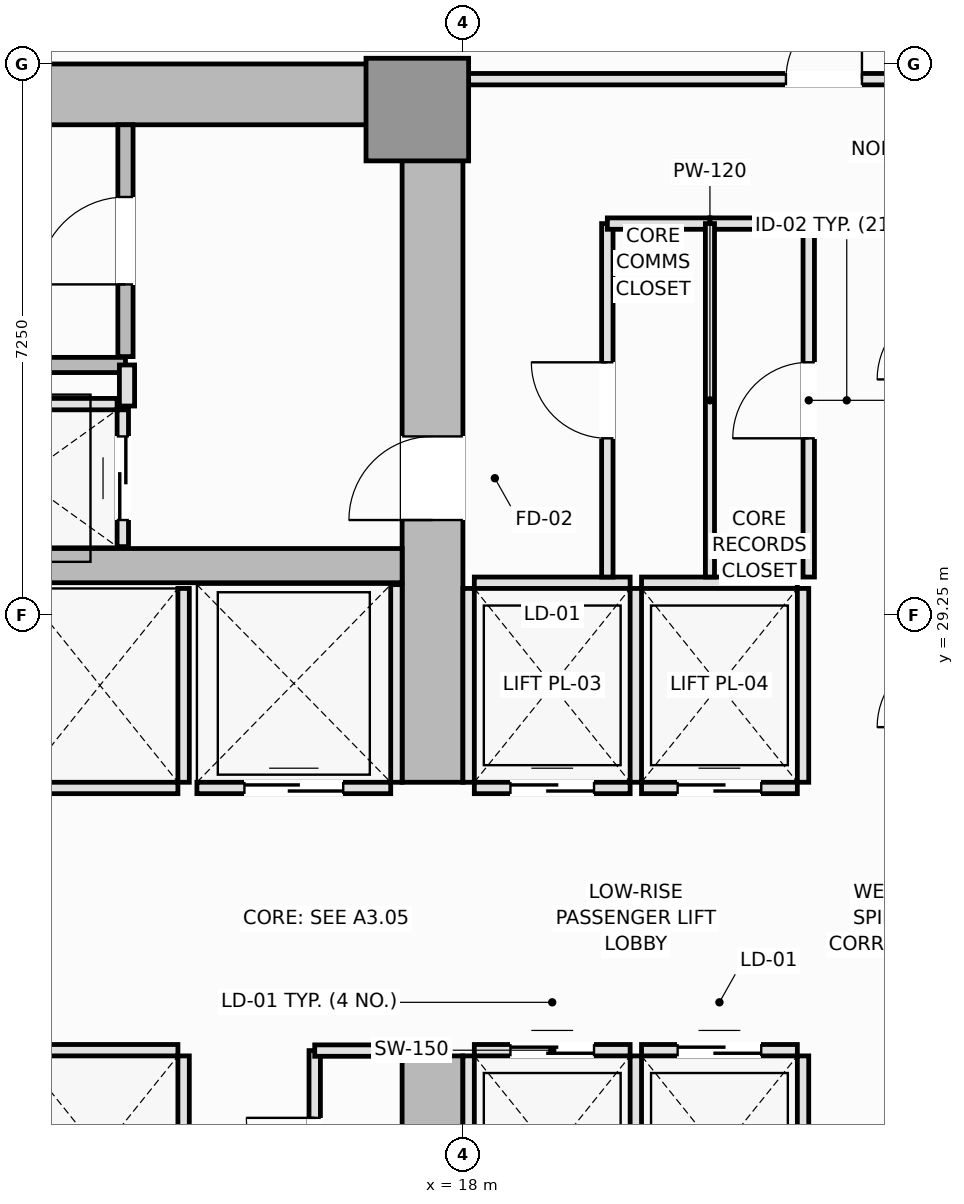
"""IFC4 building model, lengths in metres.
Left out: names, types, materials, properties, quantities, classifications, styles, units other than length and angle.
Written with IfcOpenShell. Run it as: python <this file> out.ifc"""

import sys

from ifc_helpers import new_model, si_unit, direction, frame, frame_2d, origin, origin_2d, place, context, subcontext, project, spatial, rectangle, extrude, element, fill, save


model = new_model("IFC4")
c1 = context("Model", 3, precision=1e-05, world=origin(), true_north=direction((0.0, 1.0)))
c2 = subcontext(c1, "Body", "Model", "MODEL_VIEW")
j1 = project(units=[si_unit("LENGTHUNIT", "METRE"), si_unit("PLANEANGLEUNIT", "RADIAN")], contexts=[c1])
p1 = place(None, origin())
s1 = spatial("IfcSite", under=j1, at=p1, CompositionType="ELEMENT")
p2 = place(p1, origin())
s2 = spatial("IfcBuilding", under=s1, at=p2, CompositionType="ELEMENT")
p3 = place(p2, frame((0.0, 0.0, 78.85)))
s3 = spatial("IfcBuildingStorey", under=s2, at=p3, CompositionType="ELEMENT", Elevation=78.85)
p4 = place(p3, frame((4.5, 36.1, 0.0), z_axis=(0.0, 0.0, 1.0), x_axis=(1.0, 0.0, 0.0)))
e1 = element("IfcWall", 1, at=p4, inside=s3, PredefinedType="SHEAR", context=c2, shape_type="SweptSolid", body=[
    extrude(rectangle(XDim=13.5, YDim=0.8, at=frame_2d((6.75, 0.0))), origin(), (0.0, 0.0, 1.0), 3.55),
])
p5 = place(p3, frame((17.6, 14.8, 0.0), z_axis=(0.0, 0.0, 1.0), x_axis=(0.0, 1.0, 0.0)))
e2 = element("IfcWall", 2, at=p5, inside=s3, PredefinedType="SHEAR", context=c2, shape_type="SweptSolid", body=[
    extrude(rectangle(XDim=8.65, YDim=0.8, at=frame_2d((4.325, 0.0))), origin(), (0.0, 0.0, 1.0), 3.55),
])
p6 = place(p5, frame((4.1, 0.0, 0.0)))
e3 = element("IfcOpeningElement", 3, at=p6, cuts=e2, PredefinedType="OPENING", context=c2, shape_type="SweptSolid", body=[
    extrude(rectangle(XDim=1.1, YDim=2.15, at=frame_2d((0.55, 1.075))), frame((0.0, 0.41, 0.0), z_axis=(0.0, -1.0, 0.0), x_axis=(1.0, 0.0, 0.0)), (0.0, 0.0, 1.0), 0.82),
])
p7 = place(p3, frame((17.6, 27.05, 0.0), z_axis=(0.0, 0.0, 1.0), x_axis=(0.0, 1.0, 0.0)))
e4 = element("IfcWall", 4, at=p7, inside=s3, PredefinedType="SHEAR", context=c2, shape_type="SweptSolid", body=[
    extrude(rectangle(XDim=8.65, YDim=0.8, at=frame_2d((4.325, 0.0))), origin(), (0.0, 0.0, 1.0), 3.55),
])
p8 = place(p7, frame((3.45, 0.0, 0.0)))
e5 = element("IfcOpeningElement", 5, at=p8, cuts=e4, PredefinedType="OPENING", context=c2, shape_type="SweptSolid", body=[
    extrude(rectangle(XDim=1.1, YDim=2.15, at=frame_2d((0.55, 1.075))), frame((0.0, 0.41, 0.0), z_axis=(0.0, -1.0, 0.0), x_axis=(1.0, 0.0, 0.0)), (0.0, 0.0, 1.0), 0.82),
])
p9 = place(p3, frame((5.3, 29.9, 0.0), z_axis=(0.0, 0.0, 1.0), x_axis=(1.0, 0.0, 0.0)))
e6 = element("IfcWall", 6, at=p9, inside=s3, PredefinedType="SHEAR", context=c2, shape_type="SweptSolid", body=[
    extrude(rectangle(XDim=11.9, YDim=0.45, at=frame_2d((5.95, 0.0))), origin(), (0.0, 0.0, 1.0), 3.55),
])
p10 = place(p3, frame((17.4, 35.9, 0.0), z_axis=(0.0, 0.0, 1.0), x_axis=(1.0, 0.0, 0.0)))
e7 = element("IfcColumn", 7, at=p10, inside=s3, PredefinedType="PILASTER", context=c2, shape_type="SweptSolid", body=[
    extrude(rectangle(XDim=1.35, YDim=1.35, at=origin_2d()), origin(), (0.0, 0.0, 1.0), 3.55),
])
p11 = place(p3, frame((5.9, 32.54, 0.0), z_axis=(0.0, 0.0, 1.0), x_axis=(1.0, 0.0, 0.0)))
e8 = element("IfcWall", 8, at=p11, inside=s3, PredefinedType="SOLIDWALL", context=c2, shape_type="SweptSolid", body=[
    extrude(rectangle(XDim=7.66, YDim=0.2, at=frame_2d((3.83, 0.0))), origin(), (0.0, 0.0, 1.0), 3.55),
])
p12 = place(p3, frame((13.56, 32.65, 0.0), z_axis=(0.0, 0.0, 1.0), x_axis=(0.0, 1.0, 0.0)))
e9 = element("IfcWall", 9, at=p12, inside=s3, PredefinedType="SOLIDWALL", context=c2, shape_type="SweptSolid", body=[
    extrude(rectangle(XDim=3.05, YDim=0.2, at=frame_2d((1.525, 0.0))), origin(), (0.0, 0.0, 1.0), 3.55),
])
p13 = place(p12, frame((0.95, 0.0, 0.0)))
e10 = element("IfcOpeningElement", 10, at=p13, cuts=e9, PredefinedType="OPENING", context=c2, shape_type="SweptSolid", body=[
    extrude(rectangle(XDim=1.15, YDim=2.15, at=frame_2d((0.575, 1.075))), frame((0.0, 0.11, 0.0), z_axis=(0.0, -1.0, 0.0), x_axis=(1.0, 0.0, 0.0)), (0.0, 0.0, 1.0), 0.22),
])
p14 = place(p3, frame((18.15, 23.525, 0.0), z_axis=(0.0, 0.0, 1.0), x_axis=(1.0, 0.0, 0.0)))
e11 = element("IfcWall", 11, at=p14, inside=s3, PredefinedType="PARTITIONING", context=c2, shape_type="SweptSolid", body=[
    extrude(rectangle(XDim=2.05, YDim=0.15, at=frame_2d((1.025, 0.0))), origin(), (0.0, 0.0, 1.0), 3.37),
])
p15 = place(p14, frame((0.475, 0.0, 0.0)))
e12 = element("IfcOpeningElement", 12, at=p15, cuts=e11, PredefinedType="OPENING", context=c2, shape_type="SweptSolid", body=[
    extrude(rectangle(XDim=1.1, YDim=2.2, at=frame_2d((0.55, 1.1))), frame((0.0, 0.085, 0.0), z_axis=(0.0, -1.0, 0.0), x_axis=(1.0, 0.0, 0.0)), (0.0, 0.0, 1.0), 0.17),
])
for number, where, z_axis, x_axis in (
    (13, (18.075, 20.9, 0.0), (0.0, 0.0, 1.0), (0.0, 1.0, 0.0)),
    (14, (20.275, 20.9, 0.0), (0.0, 0.0, 1.0), (0.0, 1.0, 0.0)),
):
    element("IfcWall", number, at=place(p3, frame(where, z_axis=z_axis, x_axis=x_axis)), inside=s3, PredefinedType="PARTITIONING", context=c2, shape_type="SweptSolid", body=[
        extrude(rectangle(XDim=2.55, YDim=0.15, at=frame_2d((1.275, 0.0))), origin(), (0.0, 0.0, 1.0), 3.37),
    ])
p16 = place(p3, frame((20.35, 23.525, 0.0), z_axis=(0.0, 0.0, 1.0), x_axis=(1.0, 0.0, 0.0)))
e15 = element("IfcWall", 15, at=p16, inside=s3, PredefinedType="PARTITIONING", context=c2, shape_type="SweptSolid", body=[
    extrude(rectangle(XDim=2.05, YDim=0.15, at=frame_2d((1.025, 0.0))), origin(), (0.0, 0.0, 1.0), 3.37),
])
p17 = place(p16, frame((0.475, 0.0, 0.0)))
e16 = element("IfcOpeningElement", 16, at=p17, cuts=e15, PredefinedType="OPENING", context=c2, shape_type="SweptSolid", body=[
    extrude(rectangle(XDim=1.1, YDim=2.2, at=frame_2d((0.55, 1.1))), frame((0.0, 0.085, 0.0), z_axis=(0.0, -1.0, 0.0), x_axis=(1.0, 0.0, 0.0)), (0.0, 0.0, 1.0), 0.17),
])
p18 = place(p3, frame((22.475, 20.9, 0.0), z_axis=(0.0, 0.0, 1.0), x_axis=(0.0, 1.0, 0.0)))
e17 = element("IfcWall", 17, at=p18, inside=s3, PredefinedType="PARTITIONING", context=c2, shape_type="SweptSolid", body=[
    extrude(rectangle(XDim=2.55, YDim=0.15, at=frame_2d((1.275, 0.0))), origin(), (0.0, 0.0, 1.0), 3.37),
])
p19 = place(p3, frame((18.15, 26.975, 0.0), z_axis=(0.0, 0.0, 1.0), x_axis=(1.0, 0.0, 0.0)))
e18 = element("IfcWall", 18, at=p19, inside=s3, PredefinedType="PARTITIONING", context=c2, shape_type="SweptSolid", body=[
    extrude(rectangle(XDim=2.05, YDim=0.15, at=frame_2d((1.025, 0.0))), origin(), (0.0, 0.0, 1.0), 3.37),
])
p20 = place(p19, frame((0.475, 0.0, 0.0)))
e19 = element("IfcOpeningElement", 19, at=p20, cuts=e18, PredefinedType="OPENING", context=c2, shape_type="SweptSolid", body=[
    extrude(rectangle(XDim=1.1, YDim=2.2, at=frame_2d((0.55, 1.1))), frame((0.0, 0.085, 0.0), z_axis=(0.0, -1.0, 0.0), x_axis=(1.0, 0.0, 0.0)), (0.0, 0.0, 1.0), 0.17),
])
p21 = place(p3, frame((18.15, 29.675, 0.0), z_axis=(0.0, 0.0, 1.0), x_axis=(1.0, 0.0, 0.0)))
e20 = element("IfcWall", 20, at=p21, inside=s3, PredefinedType="PARTITIONING", context=c2, shape_type="SweptSolid", body=[
    extrude(rectangle(XDim=2.05, YDim=0.15, at=frame_2d((1.025, 0.0))), origin(), (0.0, 0.0, 1.0), 3.37),
])
for number, where, z_axis, x_axis in (
    (21, (18.075, 27.05, 0.0), (0.0, 0.0, 1.0), (0.0, 1.0, 0.0)),
    (22, (20.275, 27.05, 0.0), (0.0, 0.0, 1.0), (0.0, 1.0, 0.0)),
):
    element("IfcWall", number, at=place(p3, frame(where, z_axis=z_axis, x_axis=x_axis)), inside=s3, PredefinedType="PARTITIONING", context=c2, shape_type="SweptSolid", body=[
        extrude(rectangle(XDim=2.55, YDim=0.15, at=frame_2d((1.275, 0.0))), origin(), (0.0, 0.0, 1.0), 3.37),
    ])
p22 = place(p3, frame((20.35, 26.975, 0.0), z_axis=(0.0, 0.0, 1.0), x_axis=(1.0, 0.0, 0.0)))
e23 = element("IfcWall", 23, at=p22, inside=s3, PredefinedType="PARTITIONING", context=c2, shape_type="SweptSolid", body=[
    extrude(rectangle(XDim=2.05, YDim=0.15, at=frame_2d((1.025, 0.0))), origin(), (0.0, 0.0, 1.0), 3.37),
])
p23 = place(p22, frame((0.475, 0.0, 0.0)))
e24 = element("IfcOpeningElement", 24, at=p23, cuts=e23, PredefinedType="OPENING", context=c2, shape_type="SweptSolid", body=[
    extrude(rectangle(XDim=1.1, YDim=2.2, at=frame_2d((0.55, 1.1))), frame((0.0, 0.085, 0.0), z_axis=(0.0, -1.0, 0.0), x_axis=(1.0, 0.0, 0.0)), (0.0, 0.0, 1.0), 0.17),
])
p24 = place(p3, frame((20.35, 29.675, 0.0), z_axis=(0.0, 0.0, 1.0), x_axis=(1.0, 0.0, 0.0)))
e25 = element("IfcWall", 25, at=p24, inside=s3, PredefinedType="PARTITIONING", context=c2, shape_type="SweptSolid", body=[
    extrude(rectangle(XDim=2.05, YDim=0.15, at=frame_2d((1.025, 0.0))), origin(), (0.0, 0.0, 1.0), 3.37),
])
p25 = place(p3, frame((22.475, 27.05, 0.0), z_axis=(0.0, 0.0, 1.0), x_axis=(0.0, 1.0, 0.0)))
e26 = element("IfcWall", 26, at=p25, inside=s3, PredefinedType="PARTITIONING", context=c2, shape_type="SweptSolid", body=[
    extrude(rectangle(XDim=2.55, YDim=0.15, at=frame_2d((1.275, 0.0))), origin(), (0.0, 0.0, 1.0), 3.37),
])
p26 = place(p3, frame((12.2, 23.525, 0.0), z_axis=(0.0, 0.0, 1.0), x_axis=(1.0, 0.0, 0.0)))
e27 = element("IfcWall", 27, at=p26, inside=s3, PredefinedType="PARTITIONING", context=c2, shape_type="SweptSolid", body=[
    extrude(rectangle(XDim=2.05, YDim=0.15, at=frame_2d((1.025, 0.0))), origin(), (0.0, 0.0, 1.0), 3.37),
])
p27 = place(p3, frame((14.325, 20.9, 0.0), z_axis=(0.0, 0.0, 1.0), x_axis=(0.0, 1.0, 0.0)))
e28 = element("IfcWall", 28, at=p27, inside=s3, PredefinedType="PARTITIONING", context=c2, shape_type="SweptSolid", body=[
    extrude(rectangle(XDim=2.55, YDim=0.15, at=frame_2d((1.275, 0.0))), origin(), (0.0, 0.0, 1.0), 3.37),
])
p28 = place(p3, frame((12.2, 26.975, 0.0), z_axis=(0.0, 0.0, 1.0), x_axis=(1.0, 0.0, 0.0)))
e29 = element("IfcWall", 29, at=p28, inside=s3, PredefinedType="PARTITIONING", context=c2, shape_type="SweptSolid", body=[
    extrude(rectangle(XDim=2.05, YDim=0.15, at=frame_2d((1.025, 0.0))), origin(), (0.0, 0.0, 1.0), 3.37),
])
p29 = place(p3, frame((14.325, 27.05, 0.0), z_axis=(0.0, 0.0, 1.0), x_axis=(0.0, 1.0, 0.0)))
e30 = element("IfcWall", 30, at=p29, inside=s3, PredefinedType="PARTITIONING", context=c2, shape_type="SweptSolid", body=[
    extrude(rectangle(XDim=2.55, YDim=0.15, at=frame_2d((1.275, 0.0))), origin(), (0.0, 0.0, 1.0), 3.37),
])
p30 = place(p3, frame((14.5, 26.975, 0.0), z_axis=(0.0, 0.0, 1.0), x_axis=(1.0, 0.0, 0.0)))
e31 = element("IfcWall", 31, at=p30, inside=s3, PredefinedType="PARTITIONING", context=c2, shape_type="SweptSolid", body=[
    extrude(rectangle(XDim=2.55, YDim=0.15, at=frame_2d((1.275, 0.0))), origin(), (0.0, 0.0, 1.0), 3.37),
])
p31 = place(p30, frame((0.625, 0.0, 0.0)))
e32 = element("IfcOpeningElement", 32, at=p31, cuts=e31, PredefinedType="OPENING", context=c2, shape_type="SweptSolid", body=[
    extrude(rectangle(XDim=1.3, YDim=2.2, at=frame_2d((0.65, 1.1))), frame((0.0, 0.085, 0.0), z_axis=(0.0, -1.0, 0.0), x_axis=(1.0, 0.0, 0.0)), (0.0, 0.0, 1.0), 0.17),
])
p32 = place(p3, frame((17.125, 27.05, 0.0), z_axis=(0.0, 0.0, 1.0), x_axis=(0.0, 1.0, 0.0)))
e33 = element("IfcWall", 33, at=p32, inside=s3, PredefinedType="PARTITIONING", context=c2, shape_type="SweptSolid", body=[
    extrude(rectangle(XDim=2.6, YDim=0.15, at=frame_2d((1.3, 0.0))), origin(), (0.0, 0.0, 1.0), 3.37),
])
p33 = place(p3, frame((10.95, 32.025, 0.0), z_axis=(0.0, 0.0, 1.0), x_axis=(1.0, 0.0, 0.0)))
e34 = element("IfcWall", 34, at=p33, inside=s3, PredefinedType="PARTITIONING", context=c2, shape_type="SweptSolid", body=[
    extrude(rectangle(XDim=2.5, YDim=0.15, at=frame_2d((1.25, 0.0))), origin(), (0.0, 0.0, 1.0), 3.37),
])
p34 = place(p3, frame((13.525, 30.15, 0.0), z_axis=(0.0, 0.0, 1.0), x_axis=(0.0, 1.0, 0.0)))
e35 = element("IfcWall", 35, at=p34, inside=s3, PredefinedType="PARTITIONING", context=c2, shape_type="SweptSolid", body=[
    extrude(rectangle(XDim=1.8, YDim=0.15, at=frame_2d((0.9, 0.0))), origin(), (0.0, 0.0, 1.0), 3.37),
])
p35 = place(p34, frame((0.35, 0.0, 0.0)))
e36 = element("IfcOpeningElement", 36, at=p35, cuts=e35, PredefinedType="OPENING", context=c2, shape_type="SweptSolid", body=[
    extrude(rectangle(XDim=1.1, YDim=2.2, at=frame_2d((0.55, 1.1))), frame((0.0, 0.085, 0.0), z_axis=(0.0, -1.0, 0.0), x_axis=(1.0, 0.0, 0.0)), (0.0, 0.0, 1.0), 0.17),
])
p36 = place(p3, frame((13.58, 32.0, 0.0), z_axis=(0.0, 0.0, 1.0), x_axis=(0.0, 1.0, 0.0)))
e37 = element("IfcWall", 37, at=p36, inside=s3, PredefinedType="PARTITIONING", context=c2, shape_type="SweptSolid", body=[
    extrude(rectangle(XDim=0.54, YDim=0.2, at=frame_2d((0.27, 0.0))), origin(), (0.0, 0.0, 1.0), 3.37),
])
p37 = place(p3, frame((16.05, 20.85, 0.0), z_axis=(0.0, 0.0, 1.0), x_axis=(0.0, 1.0, 0.0)))
e38 = element("IfcWall", 38, at=p37, inside=s3, PredefinedType="PARTITIONING", context=c2, shape_type="SweptSolid", body=[
    extrude(rectangle(XDim=2.67, YDim=0.15, at=frame_2d((1.335, 0.0))), origin(), (0.0, 0.0, 1.0), 3.37),
])
p38 = place(p37, frame((0.885, 0.0, 0.0)))
e39 = element("IfcOpeningElement", 39, at=p38, cuts=e38, PredefinedType="OPENING", context=c2, shape_type="SweptSolid", body=[
    extrude(rectangle(XDim=0.9, YDim=2.1, at=frame_2d((0.45, 1.05))), frame((0.0, 0.085, 0.0), z_axis=(0.0, -1.0, 0.0), x_axis=(1.0, 0.0, 0.0)), (0.0, 0.0, 1.0), 0.17),
])
p39 = place(p3, frame((16.05, 23.52, 0.0), z_axis=(0.0, 0.0, 1.0), x_axis=(1.0, 0.0, 0.0)))
e40 = element("IfcWall", 40, at=p39, inside=s3, PredefinedType="PARTITIONING", context=c2, shape_type="SweptSolid", body=[
    extrude(rectangle(XDim=1.17, YDim=0.15, at=frame_2d((0.585, 0.0))), origin(), (0.0, 0.0, 1.0), 3.37),
])
p40 = place(p3, frame((22.55, 29.75, 0.0), z_axis=(0.0, 0.0, 1.0), x_axis=(0.0, 1.0, 0.0)))
e41 = element("IfcWall", 41, at=p40, inside=s3, PredefinedType="PARTITIONING", context=c2, shape_type="SweptSolid", body=[
    extrude(rectangle(XDim=4.65, YDim=0.15, at=frame_2d((2.325, 0.0))), origin(), (0.0, 0.0, 1.0), 3.01),
])
p41 = place(p40, frame((1.825, 0.0, 0.0)))
e42 = element("IfcOpeningElement", 42, at=p41, cuts=e41, PredefinedType="OPENING", context=c2, shape_type="SweptSolid", body=[
    extrude(rectangle(XDim=1.0, YDim=2.15, at=frame_2d((0.5, 1.075))), frame((0.0, 0.085, 0.0), z_axis=(0.0, -1.0, 0.0), x_axis=(1.0, 0.0, 0.0)), (0.0, 0.0, 1.0), 0.17),
])
p42 = place(p3, frame((19.9, 29.75, 0.0), z_axis=(0.0, 0.0, 1.0), x_axis=(0.0, 1.0, 0.0)))
e43 = element("IfcWall", 43, at=p42, inside=s3, PredefinedType="PARTITIONING", context=c2, shape_type="SweptSolid", body=[
    extrude(rectangle(XDim=4.65, YDim=0.15, at=frame_2d((2.325, 0.0))), origin(), (0.0, 0.0, 1.0), 3.37),
])
p43 = place(p42, frame((1.825, 0.0, 0.0)))
e44 = element("IfcOpeningElement", 44, at=p43, cuts=e43, PredefinedType="OPENING", context=c2, shape_type="SweptSolid", body=[
    extrude(rectangle(XDim=1.0, YDim=2.15, at=frame_2d((0.5, 1.075))), frame((0.0, 0.085, 0.0), z_axis=(0.0, -1.0, 0.0), x_axis=(1.0, 0.0, 0.0)), (0.0, 0.0, 1.0), 0.17),
])
p44 = place(p3, frame((19.9, 34.4, 0.0), z_axis=(0.0, 0.0, 1.0), x_axis=(1.0, 0.0, 0.0)))
e45 = element("IfcWall", 45, at=p44, inside=s3, PredefinedType="PARTITIONING", context=c2, shape_type="SweptSolid", body=[
    extrude(rectangle(XDim=1.35, YDim=0.15, at=frame_2d((0.675, 0.0))), origin(), (0.0, 0.0, 1.0), 3.37),
])
p45 = place(p3, frame((21.25, 34.4, 0.0), z_axis=(0.0, 0.0, 1.0), x_axis=(1.0, 0.0, 0.0)))
e46 = element("IfcWall", 46, at=p45, inside=s3, PredefinedType="PARTITIONING", context=c2, shape_type="SweptSolid", body=[
    extrude(rectangle(XDim=1.3, YDim=0.15, at=frame_2d((0.65, 0.0))), origin(), (0.0, 0.0, 1.0), 3.37),
])
p46 = place(p3, frame((18.0, 36.3, 0.0), z_axis=(0.0, 0.0, 1.0), x_axis=(1.0, 0.0, 0.0)))
e47 = element("IfcWall", 47, at=p46, inside=s3, PredefinedType="PARTITIONING", context=c2, shape_type="SweptSolid", body=[
    extrude(rectangle(XDim=9.5, YDim=0.15, at=frame_2d((4.75, 0.0))), origin(), (0.0, 0.0, 1.0), 3.37),
])
p47 = place(p46, frame((4.25, 0.0, 0.0)))
e48 = element("IfcOpeningElement", 48, at=p47, cuts=e47, PredefinedType="OPENING", context=c2, shape_type="SweptSolid", body=[
    extrude(rectangle(XDim=1.0, YDim=2.15, at=frame_2d((0.5, 1.075))), frame((0.0, 0.085, 0.0), z_axis=(0.0, -1.0, 0.0), x_axis=(1.0, 0.0, 0.0)), (0.0, 0.0, 1.0), 0.17),
])
p48 = place(p3, frame((21.25, 29.75, 0.0), z_axis=(0.0, 0.0, 1.0), x_axis=(0.0, 1.0, 0.0)))
e49 = element("IfcWall", 49, at=p48, inside=s3, PredefinedType="PARTITIONING", context=c2, shape_type="SweptSolid", body=[
    extrude(rectangle(XDim=4.65, YDim=0.12, at=frame_2d((2.325, 0.0))), origin(), (0.0, 0.0, 1.0), 3.37),
])
p49 = place(p13, origin())
e50 = element("IfcDoor", 50, at=p49, inside=s3, OperationType="SINGLE_SWING_LEFT", PredefinedType="DOOR", context=c2, shape_type="SweptSolid", body=[
    extrude(rectangle(XDim=1.15, YDim=2.15, at=frame_2d((0.575, 1.075))), frame((0.0, 0.025, 0.0), z_axis=(0.0, -1.0, 0.0), x_axis=(1.0, 0.0, 0.0)), (0.0, 0.0, 1.0), 0.05),
])
fill(e10, e50)
p50 = place(p15, origin())
e51 = element("IfcDoor", 51, at=p50, inside=s3, OperationType="DOUBLE_DOOR_SLIDING", PredefinedType="DOOR", context=c2, shape_type="SweptSolid", body=[
    extrude(rectangle(XDim=1.1, YDim=2.2, at=frame_2d((0.55, 1.1))), frame((0.0, 0.025, 0.0), z_axis=(0.0, -1.0, 0.0), x_axis=(1.0, 0.0, 0.0)), (0.0, 0.0, 1.0), 0.05),
])
fill(e12, e51)
p51 = place(p17, origin())
e52 = element("IfcDoor", 52, at=p51, inside=s3, OperationType="DOUBLE_DOOR_SLIDING", PredefinedType="DOOR", context=c2, shape_type="SweptSolid", body=[
    extrude(rectangle(XDim=1.1, YDim=2.2, at=frame_2d((0.55, 1.1))), frame((0.0, 0.025, 0.0), z_axis=(0.0, -1.0, 0.0), x_axis=(1.0, 0.0, 0.0)), (0.0, 0.0, 1.0), 0.05),
])
fill(e16, e52)
p52 = place(p20, origin())
e53 = element("IfcDoor", 53, at=p52, inside=s3, OperationType="DOUBLE_DOOR_SLIDING", PredefinedType="DOOR", context=c2, shape_type="SweptSolid", body=[
    extrude(rectangle(XDim=1.1, YDim=2.2, at=frame_2d((0.55, 1.1))), frame((0.0, 0.025, 0.0), z_axis=(0.0, -1.0, 0.0), x_axis=(1.0, 0.0, 0.0)), (0.0, 0.0, 1.0), 0.05),
])
fill(e19, e53)
p53 = place(p23, origin())
e54 = element("IfcDoor", 54, at=p53, inside=s3, OperationType="DOUBLE_DOOR_SLIDING", PredefinedType="DOOR", context=c2, shape_type="SweptSolid", body=[
    extrude(rectangle(XDim=1.1, YDim=2.2, at=frame_2d((0.55, 1.1))), frame((0.0, 0.025, 0.0), z_axis=(0.0, -1.0, 0.0), x_axis=(1.0, 0.0, 0.0)), (0.0, 0.0, 1.0), 0.05),
])
fill(e24, e54)
p54 = place(p31, origin())
e55 = element("IfcDoor", 55, at=p54, inside=s3, OperationType="DOUBLE_DOOR_SLIDING", PredefinedType="DOOR", context=c2, shape_type="SweptSolid", body=[
    extrude(rectangle(XDim=1.3, YDim=2.2, at=frame_2d((0.65, 1.1))), frame((0.0, 0.025, 0.0), z_axis=(0.0, -1.0, 0.0), x_axis=(1.0, 0.0, 0.0)), (0.0, 0.0, 1.0), 0.05),
])
fill(e32, e55)
p55 = place(p35, origin())
e56 = element("IfcDoor", 56, at=p55, inside=s3, OperationType="DOUBLE_DOOR_SLIDING", PredefinedType="DOOR", context=c2, shape_type="SweptSolid", body=[
    extrude(rectangle(XDim=1.1, YDim=2.2, at=frame_2d((0.55, 1.1))), frame((0.0, 0.025, 0.0), z_axis=(0.0, -1.0, 0.0), x_axis=(1.0, 0.0, 0.0)), (0.0, 0.0, 1.0), 0.05),
])
fill(e36, e56)
p56 = place(p8, origin())
e57 = element("IfcDoor", 57, at=p56, inside=s3, OperationType="SINGLE_SWING_LEFT", PredefinedType="DOOR", context=c2, shape_type="SweptSolid", body=[
    extrude(rectangle(XDim=1.1, YDim=2.15, at=frame_2d((0.55, 1.075))), frame((0.0, 0.025, 0.0), z_axis=(0.0, -1.0, 0.0), x_axis=(1.0, 0.0, 0.0)), (0.0, 0.0, 1.0), 0.05),
])
fill(e5, e57)
p57 = place(p38, origin())
e58 = element("IfcDoor", 58, at=p57, inside=s3, OperationType="SINGLE_SWING_RIGHT", PredefinedType="DOOR", context=c2, shape_type="SweptSolid", body=[
    extrude(rectangle(XDim=0.9, YDim=2.1, at=frame_2d((0.45, 1.05))), frame((0.0, 0.025, 0.0), z_axis=(0.0, -1.0, 0.0), x_axis=(1.0, 0.0, 0.0)), (0.0, 0.0, 1.0), 0.05),
])
fill(e39, e58)
p58 = place(p41, origin())
e59 = element("IfcDoor", 59, at=p58, inside=s3, OperationType="SINGLE_SWING_LEFT", PredefinedType="DOOR", context=c2, shape_type="SweptSolid", body=[
    extrude(rectangle(XDim=1.0, YDim=2.15, at=frame_2d((0.5, 1.075))), frame((0.0, 0.025, 0.0), z_axis=(0.0, -1.0, 0.0), x_axis=(1.0, 0.0, 0.0)), (0.0, 0.0, 1.0), 0.05),
])
fill(e42, e59)
p59 = place(p43, origin())
e60 = element("IfcDoor", 60, at=p59, inside=s3, OperationType="SINGLE_SWING_RIGHT", PredefinedType="DOOR", context=c2, shape_type="SweptSolid", body=[
    extrude(rectangle(XDim=1.0, YDim=2.15, at=frame_2d((0.5, 1.075))), frame((0.0, 0.025, 0.0), z_axis=(0.0, -1.0, 0.0), x_axis=(1.0, 0.0, 0.0)), (0.0, 0.0, 1.0), 0.05),
])
fill(e44, e60)
p60 = place(p47, origin())
e61 = element("IfcDoor", 61, at=p60, inside=s3, OperationType="SINGLE_SWING_RIGHT", PredefinedType="DOOR", context=c2, shape_type="SweptSolid", body=[
    extrude(rectangle(XDim=1.0, YDim=2.15, at=frame_2d((0.5, 1.075))), frame((0.0, 0.025, 0.0), z_axis=(0.0, -1.0, 0.0), x_axis=(1.0, 0.0, 0.0)), (0.0, 0.0, 1.0), 0.05),
])
fill(e48, e61)
save(model, sys.argv[1])
